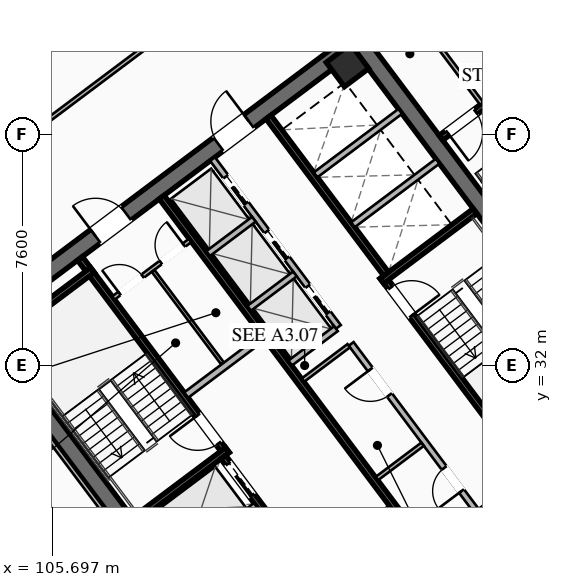
"""IFC4 building model, lengths in metres.
Left out: names, types, materials, properties, quantities, classifications, styles, units other than length and angle.
Written with IfcOpenShell. Run it as: python <this file> out.ifc"""

import sys

from ifc_helpers import new_model, si_unit, direction, frame, frame_2d, origin, origin_2d, place, context, subcontext, project, spatial, rectangle, hollow_rectangle, extrude, element, fill, save


model = new_model("IFC4")
c1 = context("Model", 3, precision=1e-05, world=origin(), true_north=direction((0.0, 1.0)))
c2 = subcontext(c1, "Body", "Model", "MODEL_VIEW")
j1 = project(units=[si_unit("LENGTHUNIT", "METRE"), si_unit("PLANEANGLEUNIT", "RADIAN")], contexts=[c1])
p1 = place(None, origin())
s1 = spatial("IfcSite", under=j1, at=p1, CompositionType="ELEMENT")
p2 = place(p1, origin())
s2 = spatial("IfcBuilding", under=s1, at=p2, CompositionType="ELEMENT")
p3 = place(p2, frame((0.0, 0.0, 153.45)))
s3 = spatial("IfcBuildingStorey", under=s2, at=p3, CompositionType="ELEMENT", Elevation=153.45)
for number, where, z_axis, x_axis in (
    (1, (112.436, 21.077, 0.0), (0.0, 0.0, 1.0), (-0.6, 0.8, 0.0)),
    (2, (115.564, 42.923, 0.0), (0.0, 0.0, 1.0), (0.6, -0.8, 0.0)),
):
    element("IfcWall", number, at=place(p3, frame(where, z_axis=z_axis, x_axis=x_axis)), inside=s3, PredefinedType="SHEAR", context=c2, shape_type="SweptSolid", body=[
        extrude(rectangle(XDim=15.6, YDim=0.55, at=frame_2d((7.8, 0.0))), origin(), (0.0, 0.0, 1.0), 3.55),
    ])
p4 = place(p3, frame((124.539, 30.498, 0.0), z_axis=(0.0, 0.0, 1.0), x_axis=(-0.799998054672, -0.600002593761, 0.0)))
e3 = element("IfcWall", 3, at=p4, inside=s3, PredefinedType="SHEAR", context=c2, shape_type="SweptSolid", body=[
    extrude(rectangle(XDim=15.06, YDim=0.55, at=frame_2d((7.53, 0.0))), origin(), (0.0, 0.0, 1.0), 3.55),
])
p5 = place(p4, frame((9.23, 0.0, 0.0)))
e4 = element("IfcOpeningElement", 4, at=p5, cuts=e3, PredefinedType="OPENING", context=c2, shape_type="SweptSolid", body=[
    extrude(rectangle(XDim=1.25, YDim=2.25, at=frame_2d((0.625, 1.125))), frame((0.0, 0.285, 0.0), z_axis=(0.0, -1.0, 0.0), x_axis=(1.0, 0.0, 0.0)), (0.0, 0.0, 1.0), 0.57),
])
p6 = place(p4, frame((4.18, 0.0, 0.0)))
e5 = element("IfcOpeningElement", 5, at=p6, cuts=e3, PredefinedType="OPENING", context=c2, shape_type="SweptSolid", body=[
    extrude(rectangle(XDim=1.25, YDim=2.25, at=frame_2d((0.625, 1.125))), frame((0.0, 0.285, 0.0), z_axis=(0.0, -1.0, 0.0), x_axis=(1.0, 0.0, 0.0)), (0.0, 0.0, 1.0), 0.57),
])
p7 = place(p3, frame((103.461, 33.502, 0.0), z_axis=(0.0, 0.0, 1.0), x_axis=(0.799998054672, 0.600002593761, 0.0)))
e6 = element("IfcWall", 6, at=p7, inside=s3, PredefinedType="SHEAR", context=c2, shape_type="SweptSolid", body=[
    extrude(rectangle(XDim=15.06, YDim=0.55, at=frame_2d((7.53, 0.0))), origin(), (0.0, 0.0, 1.0), 3.55),
])
p8 = place(p7, frame((4.58, 0.0, 0.0)))
e7 = element("IfcOpeningElement", 7, at=p8, cuts=e6, PredefinedType="OPENING", context=c2, shape_type="SweptSolid", body=[
    extrude(rectangle(XDim=1.25, YDim=2.25, at=frame_2d((0.625, 1.125))), frame((0.0, 0.285, 0.0), z_axis=(0.0, -1.0, 0.0), x_axis=(1.0, 0.0, 0.0)), (0.0, 0.0, 1.0), 0.57),
])
p9 = place(p7, frame((9.63, 0.0, 0.0)))
e8 = element("IfcOpeningElement", 8, at=p9, cuts=e6, PredefinedType="OPENING", context=c2, shape_type="SweptSolid", body=[
    extrude(rectangle(XDim=1.25, YDim=2.25, at=frame_2d((0.625, 1.125))), frame((0.0, 0.285, 0.0), z_axis=(0.0, -1.0, 0.0), x_axis=(1.0, 0.0, 0.0)), (0.0, 0.0, 1.0), 0.57),
])
p10 = place(p3, frame((115.41, 41.87, 0.0), z_axis=(0.0, 0.0, 1.0), x_axis=(0.799999996291, 0.600000004945, 0.0)))
e9 = element("IfcColumn", 9, at=p10, inside=s3, PredefinedType="COLUMN", context=c2, shape_type="SweptSolid", body=[
    extrude(hollow_rectangle(XDim=1.0, YDim=1.0, WallThickness=0.04, at=origin_2d()), origin(), (0.0, 0.0, 1.0), 3.37),
])
p11 = place(p3, frame((111.44, 29.08, 0.0), z_axis=(0.0, 0.0, 1.0), x_axis=(-0.59999029481, 0.8000072788, 0.0)))
e10 = element("IfcWall", 10, at=p11, inside=s3, PredefinedType="SHEAR", context=c2, shape_type="SweptSolid", body=[
    extrude(rectangle(XDim=8.05, YDim=0.2, at=frame_2d((4.025, 0.0))), origin(), (0.0, 0.0, 1.0), 3.37),
])
p12 = place(p11, frame((0.45, 0.0, 0.0)))
e11 = element("IfcOpeningElement", 11, at=p12, cuts=e10, PredefinedType="OPENING", context=c2, shape_type="SweptSolid", body=[
    extrude(rectangle(XDim=1.15, YDim=2.2, at=frame_2d((0.575, 1.1))), frame((0.0, 0.11, 0.0), z_axis=(0.0, -1.0, 0.0), x_axis=(1.0, 0.0, 0.0)), (0.0, 0.0, 1.0), 0.22),
])
for number, where, z_axis, x_axis in (
    (12, (108.396, 26.922, 0.0), (0.0, 0.0, 1.0), (0.8, 0.6, 0.0)),
    (13, (103.956, 32.842, 0.0), (0.0, 0.0, 1.0), (0.8, 0.6, 0.0)),
):
    element("IfcWall", number, at=place(p3, frame(where, z_axis=z_axis, x_axis=x_axis)), inside=s3, PredefinedType="SHEAR", context=c2, shape_type="SweptSolid", body=[
        extrude(rectangle(XDim=3.83, YDim=0.2, at=frame_2d((1.915, 0.0))), origin(), (0.0, 0.0, 1.0), 3.37),
    ])
p13 = place(p3, frame((116.56, 34.92, 0.0), z_axis=(0.0, 0.0, 1.0), x_axis=(0.59999029481, -0.8000072788, 0.0)))
e14 = element("IfcWall", 14, at=p13, inside=s3, PredefinedType="SHEAR", context=c2, shape_type="SweptSolid", body=[
    extrude(rectangle(XDim=8.05, YDim=0.2, at=frame_2d((4.025, 0.0))), origin(), (0.0, 0.0, 1.0), 3.37),
])
p14 = place(p13, frame((0.45, 0.0, 0.0)))
e15 = element("IfcOpeningElement", 15, at=p14, cuts=e14, PredefinedType="OPENING", context=c2, shape_type="SweptSolid", body=[
    extrude(rectangle(XDim=1.15, YDim=2.2, at=frame_2d((0.575, 1.1))), frame((0.0, 0.11, 0.0), z_axis=(0.0, -1.0, 0.0), x_axis=(1.0, 0.0, 0.0)), (0.0, 0.0, 1.0), 0.22),
])
p15 = place(p3, frame((116.54, 34.78, 0.0), z_axis=(0.0, 0.0, 1.0), x_axis=(0.800015298837, 0.599979601008, 0.0)))
e16 = element("IfcWall", 16, at=p15, inside=s3, PredefinedType="SHEAR", context=c2, shape_type="SweptSolid", body=[
    extrude(rectangle(XDim=3.83, YDim=0.2, at=frame_2d((1.915, 0.0))), origin(), (0.0, 0.0, 1.0), 3.37),
])
p16 = place(p3, frame((117.998, 25.936, 0.0), z_axis=(0.0, 0.0, 1.0), x_axis=(-0.600002693989, 0.799997979501, 0.0)))
e17 = element("IfcWall", 17, at=p16, inside=s3, PredefinedType="SHEAR", context=c2, shape_type="SweptSolid", body=[
    extrude(rectangle(XDim=14.5, YDim=0.2, at=frame_2d((7.25, 0.0))), origin(), (0.0, 0.0, 1.0), 3.37),
])
p17 = place(p3, frame((110.104, 31.028, 0.0), z_axis=(0.0, 0.0, 1.0), x_axis=(0.800018601094, 0.59997519774, 0.0)))
e18 = element("IfcWall", 18, at=p17, inside=s3, PredefinedType="SOLIDWALL", context=c2, shape_type="SweptSolid", body=[
    extrude(rectangle(XDim=3.15, YDim=0.22, at=frame_2d((1.575, 0.0))), origin(), (0.0, 0.0, 1.0), 2.513),
])
p18 = place(p3, frame((114.316, 25.412, 0.0), z_axis=(0.0, 0.0, 1.0), x_axis=(0.800018601094, 0.59997519774, 0.0)))
e19 = element("IfcWall", 19, at=p18, inside=s3, PredefinedType="SOLIDWALL", context=c2, shape_type="SweptSolid", body=[
    extrude(rectangle(XDim=3.15, YDim=0.22, at=frame_2d((1.575, 0.0))), origin(), (0.0, 0.0, 1.0), 2.513),
])
p19 = place(p18, frame((0.95, 0.0, 0.0)))
e20 = element("IfcOpeningElement", 20, at=p19, cuts=e19, PredefinedType="OPENING", context=c2, shape_type="SweptSolid", body=[
    extrude(rectangle(XDim=1.25, YDim=2.25, at=frame_2d((0.625, 1.125))), frame((0.0, 0.12, 0.0), z_axis=(0.0, -1.0, 0.0), x_axis=(1.0, 0.0, 0.0)), (0.0, 0.0, 1.0), 0.24),
])
p20 = place(p3, frame((115.19, 23.83, 0.0), z_axis=(0.0, 0.0, 1.0), x_axis=(-0.599993943644, 0.800004542231, 0.0)))
e21 = element("IfcWall", 21, at=p20, inside=s3, PredefinedType="SHEAR", context=c2, shape_type="SweptSolid", body=[
    extrude(rectangle(XDim=6.45, YDim=0.2, at=frame_2d((3.225, 0.0))), origin(), (0.0, 0.0, 1.0), 3.37),
])
p21 = place(p20, frame((4.875, 0.0, 0.0)))
e22 = element("IfcOpeningElement", 22, at=p21, cuts=e21, PredefinedType="OPENING", context=c2, shape_type="SweptSolid", body=[
    extrude(rectangle(XDim=1.3, YDim=2.25, at=frame_2d((0.65, 1.125))), frame((0.0, 0.11, 0.0), z_axis=(0.0, -1.0, 0.0), x_axis=(1.0, 0.0, 0.0)), (0.0, 0.0, 1.0), 0.22),
])
p22 = place(p20, frame((2.875, 0.0, 0.0)))
e23 = element("IfcOpeningElement", 23, at=p22, cuts=e21, PredefinedType="OPENING", context=c2, shape_type="SweptSolid", body=[
    extrude(rectangle(XDim=1.3, YDim=2.25, at=frame_2d((0.65, 1.125))), frame((0.0, 0.11, 0.0), z_axis=(0.0, -1.0, 0.0), x_axis=(1.0, 0.0, 0.0)), (0.0, 0.0, 1.0), 0.22),
])
p23 = place(p20, frame((0.675, 0.0, 0.0)))
e24 = element("IfcOpeningElement", 24, at=p23, cuts=e21, PredefinedType="OPENING", context=c2, shape_type="SweptSolid", body=[
    extrude(rectangle(XDim=1.3, YDim=2.25, at=frame_2d((0.65, 1.125))), frame((0.0, 0.11, 0.0), z_axis=(0.0, -1.0, 0.0), x_axis=(1.0, 0.0, 0.0)), (0.0, 0.0, 1.0), 0.22),
])
p24 = place(p3, frame((109.608, 25.306, 0.0), z_axis=(0.0, 0.0, 1.0), x_axis=(0.8, 0.6, 0.0)))
e25 = element("IfcWall", 25, at=p24, inside=s3, PredefinedType="SOLIDWALL", context=c2, shape_type="SweptSolid", body=[
    extrude(rectangle(XDim=3.48, YDim=0.2, at=frame_2d((1.74, 0.0))), origin(), (0.0, 0.0, 1.0), 3.37),
])
p25 = place(p3, frame((112.81, 40.17, 0.0), z_axis=(0.0, 0.0, 1.0), x_axis=(0.599993943644, -0.800004542231, 0.0)))
e26 = element("IfcWall", 26, at=p25, inside=s3, PredefinedType="SHEAR", context=c2, shape_type="SweptSolid", body=[
    extrude(rectangle(XDim=6.45, YDim=0.2, at=frame_2d((3.225, 0.0))), origin(), (0.0, 0.0, 1.0), 3.37),
])
for number, where, z_axis, x_axis in (
    (27, (115.59, 36.63, 0.0), (0.0, 0.0, 1.0), (0.8, 0.6, 0.0)),
    (28, (114.36, 38.27, 0.0), (0.0, 0.0, 1.0), (0.8, 0.6, 0.0)),
):
    element("IfcWall", number, at=place(p3, frame(where, z_axis=z_axis, x_axis=x_axis)), inside=s3, PredefinedType="SOLIDWALL", context=c2, shape_type="SweptSolid", body=[
        extrude(rectangle(XDim=3.48, YDim=0.2, at=frame_2d((1.74, 0.0))), origin(), (0.0, 0.0, 1.0), 3.37),
    ])
p26 = place(p3, frame((107.71, 34.22, 0.0), z_axis=(0.0, 0.0, 1.0), x_axis=(0.799981399002, 0.60002480053, 0.0)))
e29 = element("IfcWall", 29, at=p26, inside=s3, PredefinedType="PARTITIONING", context=c2, shape_type="SweptSolid", body=[
    extrude(rectangle(XDim=3.15, YDim=0.135, at=frame_2d((1.575, 0.0))), origin(), (0.0, 0.0, 1.0), 2.513),
])
p27 = place(p26, frame((0.25, 0.0, 0.0)))
e30 = element("IfcOpeningElement", 30, at=p27, cuts=e29, PredefinedType="OPENING", context=c2, shape_type="SweptSolid", body=[
    extrude(rectangle(XDim=0.95, YDim=2.05, at=frame_2d((0.475, 1.025))), frame((0.0, 0.077, 0.0), z_axis=(0.0, -1.0, 0.0), x_axis=(1.0, 0.0, 0.0)), (0.0, 0.0, 1.0), 0.155),
])
p28 = place(p26, frame((1.95, 0.0, 0.0)))
e31 = element("IfcOpeningElement", 31, at=p28, cuts=e29, PredefinedType="OPENING", context=c2, shape_type="SweptSolid", body=[
    extrude(rectangle(XDim=0.95, YDim=2.05, at=frame_2d((0.475, 1.025))), frame((0.0, 0.077, 0.0), z_axis=(0.0, -1.0, 0.0), x_axis=(1.0, 0.0, 0.0)), (0.0, 0.0, 1.0), 0.155),
])
p29 = place(p3, frame((111.296, 32.072, 0.0), z_axis=(0.0, 0.0, 1.0), x_axis=(-0.59995887973, 0.800030838552, 0.0)))
e32 = element("IfcWall", 32, at=p29, inside=s3, PredefinedType="PARTITIONING", context=c2, shape_type="SweptSolid", body=[
    extrude(rectangle(XDim=3.8, YDim=0.11, at=frame_2d((1.9, 0.0))), origin(), (0.0, 0.0, 1.0), 2.513),
])
p30 = place(p3, frame((119.67, 27.19, 0.0), z_axis=(0.0, 0.0, 1.0), x_axis=(-0.599988677396, 0.800008491828, 0.0)))
e33 = element("IfcWall", 33, at=p30, inside=s3, PredefinedType="SOLIDWALL", context=c2, shape_type="SweptSolid", body=[
    extrude(rectangle(XDim=6.9, YDim=0.2, at=frame_2d((3.45, 0.0))), origin(), (0.0, 0.0, 1.0), 2.513),
])
p31 = place(p30, frame((0.85, 0.0, 0.0)))
e34 = element("IfcOpeningElement", 34, at=p31, cuts=e33, PredefinedType="OPENING", context=c2, shape_type="SweptSolid", body=[
    extrude(rectangle(XDim=0.95, YDim=2.05, at=frame_2d((0.475, 1.025))), frame((0.0, 0.11, 0.0), z_axis=(0.0, -1.0, 0.0), x_axis=(1.0, 0.0, 0.0)), (0.0, 0.0, 1.0), 0.22),
])
p32 = place(p30, frame((4.8, 0.0, 0.0)))
e35 = element("IfcOpeningElement", 35, at=p32, cuts=e33, PredefinedType="OPENING", context=c2, shape_type="SweptSolid", body=[
    extrude(rectangle(XDim=1.05, YDim=2.2, at=frame_2d((0.525, 1.1))), frame((0.0, 0.11, 0.0), z_axis=(0.0, -1.0, 0.0), x_axis=(1.0, 0.0, 0.0)), (0.0, 0.0, 1.0), 0.22),
])
for number, where, z_axis, x_axis in (
    (36, (113.946, 31.522, 0.0), (0.0, 0.0, 1.0), (0.8, 0.6, 0.0)),
    (37, (116.376, 28.282, 0.0), (0.0, 0.0, 1.0), (0.8, 0.6, 0.0)),
):
    element("IfcWall", number, at=place(p3, frame(where, z_axis=z_axis, x_axis=x_axis)), inside=s3, PredefinedType="PARTITIONING", context=c2, shape_type="SweptSolid", body=[
        extrude(rectangle(XDim=1.88, YDim=0.135, at=frame_2d((0.94, 0.0))), origin(), (0.0, 0.0, 1.0), 2.513),
    ])
p33 = place(p3, frame((115.11, 33.27, 0.0), z_axis=(0.0, 0.0, 1.0), x_axis=(-0.600011322243, 0.799991508192, 0.0)))
e38 = element("IfcWall", 38, at=p33, inside=s3, PredefinedType="SOLIDWALL", context=c2, shape_type="SweptSolid", body=[
    extrude(rectangle(XDim=6.9, YDim=0.2, at=frame_2d((3.45, 0.0))), origin(), (0.0, 0.0, 1.0), 3.37),
])
p34 = place(p33, frame((0.575, 0.0, 0.0)))
e39 = element("IfcOpeningElement", 39, at=p34, cuts=e38, PredefinedType="OPENING", context=c2, shape_type="SweptSolid", body=[
    extrude(rectangle(XDim=1.1, YDim=2.2, at=frame_2d((0.55, 1.1))), frame((0.0, 0.11, 0.0), z_axis=(0.0, -1.0, 0.0), x_axis=(1.0, 0.0, 0.0)), (0.0, 0.0, 1.0), 0.22),
])
p35 = place(p33, frame((2.825, 0.0, 0.0)))
e40 = element("IfcOpeningElement", 40, at=p35, cuts=e38, PredefinedType="OPENING", context=c2, shape_type="SweptSolid", body=[
    extrude(rectangle(XDim=1.1, YDim=2.2, at=frame_2d((0.55, 1.1))), frame((0.0, 0.11, 0.0), z_axis=(0.0, -1.0, 0.0), x_axis=(1.0, 0.0, 0.0)), (0.0, 0.0, 1.0), 0.22),
])
p36 = place(p33, frame((5.075, 0.0, 0.0)))
e41 = element("IfcOpeningElement", 41, at=p36, cuts=e38, PredefinedType="OPENING", context=c2, shape_type="SweptSolid", body=[
    extrude(rectangle(XDim=1.1, YDim=2.2, at=frame_2d((0.55, 1.1))), frame((0.0, 0.11, 0.0), z_axis=(0.0, -1.0, 0.0), x_axis=(1.0, 0.0, 0.0)), (0.0, 0.0, 1.0), 0.22),
])
p37 = place(p3, frame((113.526, 32.082, 0.0), z_axis=(0.0, 0.0, 1.0), x_axis=(0.800046745961, 0.599937666993, 0.0)))
e42 = element("IfcWall", 42, at=p37, inside=s3, PredefinedType="SOLIDWALL", context=c2, shape_type="SweptSolid", body=[
    extrude(rectangle(XDim=1.88, YDim=0.2, at=frame_2d((0.94, 0.0))), origin(), (0.0, 0.0, 1.0), 3.37),
])
p38 = place(p3, frame((112.176, 33.882, 0.0), z_axis=(0.0, 0.0, 1.0), x_axis=(0.8, 0.6, 0.0)))
e43 = element("IfcWall", 43, at=p38, inside=s3, PredefinedType="SOLIDWALL", context=c2, shape_type="SweptSolid", body=[
    extrude(rectangle(XDim=1.88, YDim=0.2, at=frame_2d((0.94, 0.0))), origin(), (0.0, 0.0, 1.0), 3.37),
])
p39 = place(p3, frame((110.826, 35.682, 0.0), z_axis=(0.0, 0.0, 1.0), x_axis=(0.799984418148, 0.600020775241, 0.0)))
e44 = element("IfcWall", 44, at=p39, inside=s3, PredefinedType="SOLIDWALL", context=c2, shape_type="SweptSolid", body=[
    extrude(rectangle(XDim=1.88, YDim=0.2, at=frame_2d((0.94, 0.0))), origin(), (0.0, 0.0, 1.0), 3.37),
])
p40 = place(p3, frame((121.204, 41.528, 0.0), z_axis=(0.0, 0.0, 1.0), x_axis=(-0.800017232136, -0.599977023131, 0.0)))
e45 = element("IfcWall", 45, at=p40, inside=s3, PredefinedType="SHEAR", context=c2, shape_type="SweptSolid", body=[
    extrude(rectangle(XDim=3.4, YDim=0.2, at=frame_2d((1.7, 0.0))), origin(), (0.0, 0.0, 1.0), 3.37),
])
p41 = place(p40, frame((1.975, 0.0, 0.0)))
e46 = element("IfcOpeningElement", 46, at=p41, cuts=e45, PredefinedType="OPENING", context=c2, shape_type="SweptSolid", body=[
    extrude(rectangle(XDim=1.15, YDim=2.2, at=frame_2d((0.575, 1.1))), frame((0.0, 0.11, 0.0), z_axis=(0.0, -1.0, 0.0), x_axis=(1.0, 0.0, 0.0)), (0.0, 0.0, 1.0), 0.22),
])
p42 = place(p3, frame((119.824, 40.618, 0.0), z_axis=(0.0, 0.0, 1.0), x_axis=(-0.599982243973, 0.800013316712, 0.0)))
e47 = element("IfcWall", 47, at=p42, inside=s3, PredefinedType="PARTITIONING", context=c2, shape_type="SweptSolid", body=[
    extrude(rectangle(XDim=4.4, YDim=0.135, at=frame_2d((2.2, 0.0))), origin(), (0.0, 0.0, 1.0), 2.513),
])
p43 = place(p3, frame((94.568, 31.826, 0.0), z_axis=(0.0, 0.0, 1.0), x_axis=(0.799997191971, 0.600003744021, 0.0)))
e48 = element("IfcWall", 48, at=p43, inside=s3, PredefinedType="PARTITIONING", context=c2, shape_type="SweptSolid", body=[
    extrude(rectangle(XDim=31.3, YDim=0.135, at=frame_2d((15.65, 0.0))), origin(), (0.0, 0.0, 1.0), 2.513),
])
p44 = place(p43, frame((0.3, 0.0, 0.0)))
e49 = element("IfcOpeningElement", 49, at=p44, cuts=e48, PredefinedType="OPENING", context=c2, shape_type="SweptSolid", body=[
    extrude(rectangle(XDim=0.95, YDim=2.05, at=frame_2d((0.475, 1.025))), frame((0.0, 0.077, 0.0), z_axis=(0.0, -1.0, 0.0), x_axis=(1.0, 0.0, 0.0)), (0.0, 0.0, 1.0), 0.155),
])
p45 = place(p3, frame((132.13, 33.91, 0.0), z_axis=(0.0, 0.0, 1.0), x_axis=(-0.799997191971, -0.600003744021, 0.0)))
e50 = element("IfcWall", 50, at=p45, inside=s3, PredefinedType="PARTITIONING", context=c2, shape_type="SweptSolid", body=[
    extrude(rectangle(XDim=31.3, YDim=0.135, at=frame_2d((15.65, 0.0))), origin(), (0.0, 0.0, 1.0), 2.513),
])
p46 = place(p45, frame((29.97, 0.0, 0.0)))
e51 = element("IfcOpeningElement", 51, at=p46, cuts=e50, PredefinedType="OPENING", context=c2, shape_type="SweptSolid", body=[
    extrude(rectangle(XDim=0.95, YDim=2.05, at=frame_2d((0.475, 1.025))), frame((0.0, 0.077, 0.0), z_axis=(0.0, -1.0, 0.0), x_axis=(1.0, 0.0, 0.0)), (0.0, 0.0, 1.0), 0.155),
])
p47 = place(p45, frame((0.38, 0.0, 0.0)))
e52 = element("IfcOpeningElement", 52, at=p47, cuts=e50, PredefinedType="OPENING", context=c2, shape_type="SweptSolid", body=[
    extrude(rectangle(XDim=0.95, YDim=2.05, at=frame_2d((0.475, 1.025))), frame((0.0, 0.077, 0.0), z_axis=(0.0, -1.0, 0.0), x_axis=(1.0, 0.0, 0.0)), (0.0, 0.0, 1.0), 0.155),
])
p48 = place(p3, frame((112.104, 20.928, 0.0), z_axis=(0.0, 0.0, 1.0), x_axis=(-0.599994940075, 0.800003794918, 0.0)))
e53 = element("IfcWall", 53, at=p48, inside=s3, PredefinedType="PARTITIONING", context=c2, shape_type="SweptSolid", body=[
    extrude(rectangle(XDim=15.44, YDim=0.135, at=frame_2d((7.72, 0.0))), origin(), (0.0, 0.0, 1.0), 2.513),
])
p49 = place(p8, origin())
e54 = element("IfcDoor", 54, at=p49, inside=s3, OperationType="SINGLE_SWING_LEFT", PredefinedType="DOOR", context=c2, shape_type="SweptSolid", body=[
    extrude(rectangle(XDim=1.25, YDim=2.25, at=frame_2d((0.625, 1.125))), frame((0.0, 0.025, 0.0), z_axis=(0.0, -1.0, 0.0), x_axis=(1.0, 0.0, 0.0)), (0.0, 0.0, 1.0), 0.05),
])
fill(e7, e54)
p50 = place(p9, origin())
e55 = element("IfcDoor", 55, at=p50, inside=s3, OperationType="SINGLE_SWING_RIGHT", PredefinedType="DOOR", context=c2, shape_type="SweptSolid", body=[
    extrude(rectangle(XDim=1.25, YDim=2.25, at=frame_2d((0.625, 1.125))), frame((0.0, 0.025, 0.0), z_axis=(0.0, -1.0, 0.0), x_axis=(1.0, 0.0, 0.0)), (0.0, 0.0, 1.0), 0.05),
])
fill(e8, e55)
p51 = place(p12, origin())
e56 = element("IfcDoor", 56, at=p51, inside=s3, OperationType="SINGLE_SWING_RIGHT", PredefinedType="DOOR", context=c2, shape_type="SweptSolid", body=[
    extrude(rectangle(XDim=1.15, YDim=2.2, at=frame_2d((0.575, 1.1))), frame((0.0, 0.025, 0.0), z_axis=(0.0, -1.0, 0.0), x_axis=(1.0, 0.0, 0.0)), (0.0, 0.0, 1.0), 0.05),
])
fill(e11, e56)
p52 = place(p14, origin())
e57 = element("IfcDoor", 57, at=p52, inside=s3, OperationType="SINGLE_SWING_RIGHT", PredefinedType="DOOR", context=c2, shape_type="SweptSolid", body=[
    extrude(rectangle(XDim=1.15, YDim=2.2, at=frame_2d((0.575, 1.1))), frame((0.0, 0.025, 0.0), z_axis=(0.0, -1.0, 0.0), x_axis=(1.0, 0.0, 0.0)), (0.0, 0.0, 1.0), 0.05),
])
fill(e15, e57)
p53 = place(p27, origin())
e58 = element("IfcDoor", 58, at=p53, inside=s3, OperationType="SINGLE_SWING_LEFT", PredefinedType="DOOR", context=c2, shape_type="SweptSolid", body=[
    extrude(rectangle(XDim=0.95, YDim=2.05, at=frame_2d((0.475, 1.025))), frame((0.0, 0.025, 0.0), z_axis=(0.0, -1.0, 0.0), x_axis=(1.0, 0.0, 0.0)), (0.0, 0.0, 1.0), 0.05),
])
fill(e30, e58)
p54 = place(p28, origin())
e59 = element("IfcDoor", 59, at=p54, inside=s3, OperationType="SINGLE_SWING_RIGHT", PredefinedType="DOOR", context=c2, shape_type="SweptSolid", body=[
    extrude(rectangle(XDim=0.95, YDim=2.05, at=frame_2d((0.475, 1.025))), frame((0.0, 0.025, 0.0), z_axis=(0.0, -1.0, 0.0), x_axis=(1.0, 0.0, 0.0)), (0.0, 0.0, 1.0), 0.05),
])
fill(e31, e59)
p55 = place(p31, origin())
e60 = element("IfcDoor", 60, at=p55, inside=s3, OperationType="SINGLE_SWING_LEFT", PredefinedType="DOOR", context=c2, shape_type="SweptSolid", body=[
    extrude(rectangle(XDim=0.95, YDim=2.05, at=frame_2d((0.475, 1.025))), frame((0.0, 0.025, 0.0), z_axis=(0.0, -1.0, 0.0), x_axis=(1.0, 0.0, 0.0)), (0.0, 0.0, 1.0), 0.05),
])
fill(e34, e60)
p56 = place(p32, origin())
e61 = element("IfcDoor", 61, at=p56, inside=s3, OperationType="SINGLE_SWING_RIGHT", PredefinedType="DOOR", context=c2, shape_type="SweptSolid", body=[
    extrude(rectangle(XDim=1.05, YDim=2.2, at=frame_2d((0.525, 1.1))), frame((0.0, 0.025, 0.0), z_axis=(0.0, -1.0, 0.0), x_axis=(1.0, 0.0, 0.0)), (0.0, 0.0, 1.0), 0.05),
])
fill(e35, e61)
p57 = place(p41, origin())
e62 = element("IfcDoor", 62, at=p57, inside=s3, OperationType="SINGLE_SWING_RIGHT", PredefinedType="DOOR", context=c2, shape_type="SweptSolid", body=[
    extrude(rectangle(XDim=1.15, YDim=2.2, at=frame_2d((0.575, 1.1))), frame((0.0, 0.025, 0.0), z_axis=(0.0, -1.0, 0.0), x_axis=(1.0, 0.0, 0.0)), (0.0, 0.0, 1.0), 0.05),
])
fill(e46, e62)
p58 = place(p21, origin())
e63 = element("IfcDoor", 63, at=p58, inside=s3, OperationType="SLIDING_TO_LEFT", PredefinedType="DOOR", context=c2, shape_type="SweptSolid", body=[
    extrude(rectangle(XDim=1.3, YDim=2.25, at=frame_2d((0.65, 1.125))), frame((0.0, 0.025, 0.0), z_axis=(0.0, -1.0, 0.0), x_axis=(1.0, 0.0, 0.0)), (0.0, 0.0, 1.0), 0.05),
])
fill(e22, e63)
p59 = place(p34, origin())
e64 = element("IfcDoor", 64, at=p59, inside=s3, OperationType="SLIDING_TO_LEFT", PredefinedType="DOOR", context=c2, shape_type="SweptSolid", body=[
    extrude(rectangle(XDim=1.1, YDim=2.2, at=frame_2d((0.55, 1.1))), frame((0.0, 0.025, 0.0), z_axis=(0.0, -1.0, 0.0), x_axis=(1.0, 0.0, 0.0)), (0.0, 0.0, 1.0), 0.05),
])
fill(e39, e64)
p60 = place(p35, origin())
e65 = element("IfcDoor", 65, at=p60, inside=s3, OperationType="SLIDING_TO_LEFT", PredefinedType="DOOR", context=c2, shape_type="SweptSolid", body=[
    extrude(rectangle(XDim=1.1, YDim=2.2, at=frame_2d((0.55, 1.1))), frame((0.0, 0.025, 0.0), z_axis=(0.0, -1.0, 0.0), x_axis=(1.0, 0.0, 0.0)), (0.0, 0.0, 1.0), 0.05),
])
fill(e40, e65)
p61 = place(p36, origin())
e66 = element("IfcDoor", 66, at=p61, inside=s3, OperationType="SLIDING_TO_LEFT", PredefinedType="DOOR", context=c2, shape_type="SweptSolid", body=[
    extrude(rectangle(XDim=1.1, YDim=2.2, at=frame_2d((0.55, 1.1))), frame((0.0, 0.025, 0.0), z_axis=(0.0, -1.0, 0.0), x_axis=(1.0, 0.0, 0.0)), (0.0, 0.0, 1.0), 0.05),
])
fill(e41, e66)
save(model, sys.argv[1])
